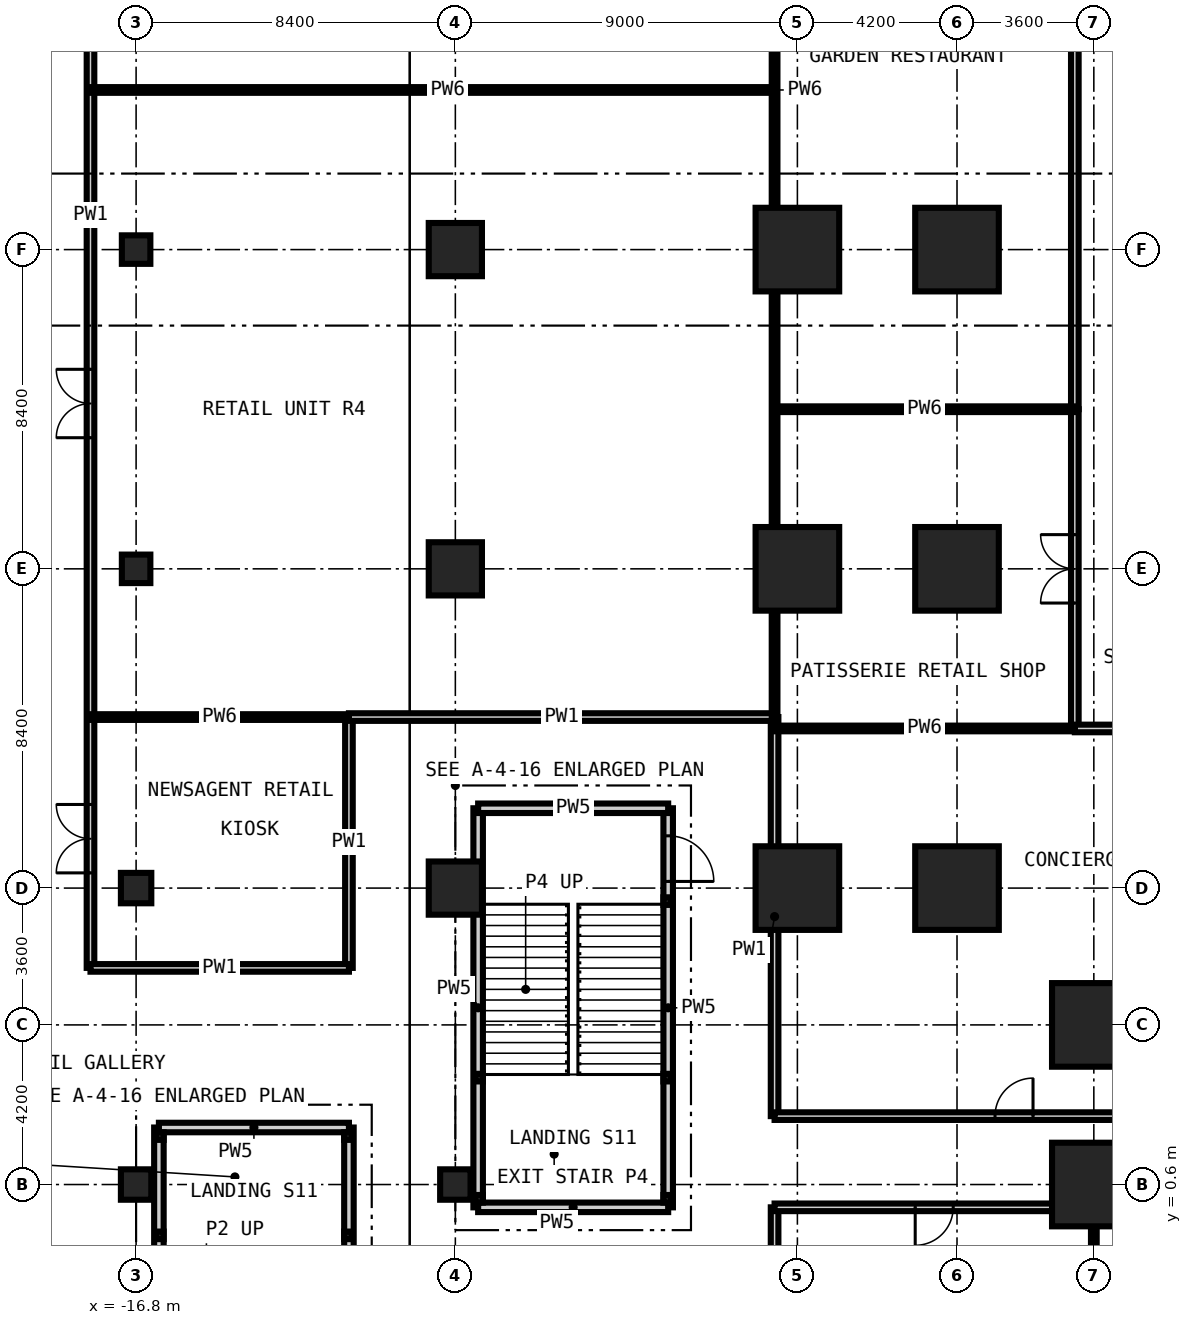
"""IFC4 building model, lengths in metres.
Left out: names, types, materials, properties, quantities, classifications, styles, units other than length and angle.
Written with IfcOpenShell. Run it as: python <this file> out.ifc"""

import sys

from ifc_helpers import new_model, si_unit, direction, frame, frame_2d, origin, origin_with_axes, origin_2d, place, context, subcontext, project, spatial, rectangle, hollow_rectangle, extrude, element, fill, save


model = new_model("IFC4")
c1 = context("Model", 3, precision=1e-05, world=origin(), true_north=direction((0.0, 1.0)))
c2 = subcontext(c1, "Body", "Model", "MODEL_VIEW")
j1 = project(units=[si_unit("LENGTHUNIT", "METRE"), si_unit("PLANEANGLEUNIT", "RADIAN")], contexts=[c1])
p1 = place(None, origin())
s1 = spatial("IfcSite", under=j1, at=p1, CompositionType="ELEMENT")
p2 = place(p1, origin())
s2 = spatial("IfcBuilding", under=s1, at=p2, CompositionType="ELEMENT")
p3 = place(p2, origin())
s3 = spatial("IfcBuildingStorey", under=s2, at=p3, CompositionType="ELEMENT", Elevation=0.0)
for number, where, z_axis, x_axis in (
    (1, (0.6, 8.4, -0.3), (0.0, 0.0, 1.0), (1.0, 0.0, 0.0)),
    (2, (0.6, 16.8, -0.3), (0.0, 0.0, 1.0), (1.0, 0.0, 0.0)),
    (3, (0.6, 25.2, -0.3), (0.0, 0.0, 1.0), (1.0, 0.0, 0.0)),
    (4, (4.8, 8.4, -0.3), (0.0, 0.0, 1.0), (1.0, 0.0, 0.0)),
    (5, (4.8, 16.8, -0.3), (0.0, 0.0, 1.0), (1.0, 0.0, 0.0)),
    (6, (4.8, 25.2, -0.3), (0.0, 0.0, 1.0), (1.0, 0.0, 0.0)),
    (7, (8.4, 0.6, -0.3), (0.0, 0.0, 1.0), (1.0, 0.0, 0.0)),
    (8, (8.4, 4.8, -0.3), (0.0, 0.0, 1.0), (1.0, 0.0, 0.0)),
):
    element("IfcColumn", number, at=place(p3, frame(where, z_axis=z_axis, x_axis=x_axis)), inside=s3, PredefinedType="COLUMN", context=c2, shape_type="SweptSolid", body=[
        extrude(rectangle(XDim=2.2, YDim=2.2, at=origin_2d()), origin(), (0.0, 0.0, 1.0), 6.0),
    ])
p4 = place(p3, frame((-16.8, 0.6, -0.5), z_axis=(0.0, 0.0, 1.0), x_axis=(1.0, 0.0, 0.0)))
e9 = element("IfcColumn", 9, at=p4, inside=s3, PredefinedType="COLUMN", context=c2, shape_type="SweptSolid", body=[
    extrude(rectangle(XDim=0.8, YDim=0.8, at=origin_2d()), origin(), (0.0, 0.0, 1.0), 6.2),
])
p5 = place(p3, frame((-16.8, 8.4, -0.3), z_axis=(0.0, 0.0, 1.0), x_axis=(1.0, 0.0, 0.0)))
e10 = element("IfcColumn", 10, at=p5, inside=s3, PredefinedType="COLUMN", context=c2, shape_type="SweptSolid", body=[
    extrude(rectangle(XDim=0.8, YDim=0.8, at=origin_2d()), origin(), (0.0, 0.0, 1.0), 6.0),
])
for number, where, z_axis, x_axis in (
    (11, (-16.8, 16.8, -0.5), (0.0, 0.0, 1.0), (1.0, 0.0, 0.0)),
    (12, (-16.8, 25.2, -0.5), (0.0, 0.0, 1.0), (1.0, 0.0, 0.0)),
):
    element("IfcColumn", number, at=place(p3, frame(where, z_axis=z_axis, x_axis=x_axis)), inside=s3, PredefinedType="COLUMN", context=c2, shape_type="SweptSolid", body=[
        extrude(rectangle(XDim=0.75, YDim=0.75, at=origin_2d()), origin(), (0.0, 0.0, 1.0), 6.2),
    ])
p6 = place(p3, frame((-8.4, 0.6, -0.3), z_axis=(0.0, 0.0, 1.0), x_axis=(1.0, 0.0, 0.0)))
e13 = element("IfcColumn", 13, at=p6, inside=s3, PredefinedType="COLUMN", context=c2, shape_type="SweptSolid", body=[
    extrude(rectangle(XDim=0.8, YDim=0.8, at=origin_2d()), origin(), (0.0, 0.0, 1.0), 6.0),
])
for number, where, z_axis, x_axis in (
    (14, (-8.4, 8.4, -0.3), (0.0, 0.0, 1.0), (1.0, 0.0, 0.0)),
    (15, (-8.4, 16.8, -0.3), (0.0, 0.0, 1.0), (1.0, 0.0, 0.0)),
    (16, (-8.4, 25.2, -0.3), (0.0, 0.0, 1.0), (1.0, 0.0, 0.0)),
):
    element("IfcColumn", number, at=place(p3, frame(where, z_axis=z_axis, x_axis=x_axis)), inside=s3, PredefinedType="COLUMN", context=c2, shape_type="SweptSolid", body=[
        extrude(rectangle(XDim=1.4, YDim=1.4, at=origin_2d()), origin(), (0.0, 0.0, 1.0), 6.0),
    ])
p7 = place(p3, frame((-18.0, 6.3, 0.0), z_axis=(0.0, 0.0, 1.0), x_axis=(0.0, 1.0, 0.0)))
e17 = element("IfcWall", 17, at=p7, inside=s3, PredefinedType="PARTITIONING", context=c2, shape_type="SweptSolid", body=[
    extrude(rectangle(XDim=39.6, YDim=0.2, at=frame_2d((19.8, 0.0))), origin(), (0.0, 0.0, 1.0), 5.7),
])
p8 = place(p7, frame((13.95, 0.0, 0.0)))
e18 = element("IfcOpeningElement", 18, at=p8, cuts=e17, PredefinedType="OPENING", context=c2, shape_type="SweptSolid", body=[
    extrude(rectangle(XDim=1.8, YDim=2.7, at=frame_2d((0.9, 1.35))), frame((0.0, 0.11, 0.0), z_axis=(0.0, -1.0, 0.0), x_axis=(1.0, 0.0, 0.0)), (0.0, 0.0, 1.0), 0.22),
])
p9 = place(p7, frame((30.45, 0.0, 0.0)))
e19 = element("IfcOpeningElement", 19, at=p9, cuts=e17, PredefinedType="OPENING", context=c2, shape_type="SweptSolid", body=[
    extrude(rectangle(XDim=1.8, YDim=2.7, at=frame_2d((0.9, 1.35))), frame((0.0, 0.11, 0.0), z_axis=(0.0, -1.0, 0.0), x_axis=(1.0, 0.0, 0.0)), (0.0, 0.0, 1.0), 0.22),
])
p10 = place(p7, frame((2.5, 0.0, 0.0)))
e20 = element("IfcOpeningElement", 20, at=p10, cuts=e17, PredefinedType="OPENING", context=c2, shape_type="SweptSolid", body=[
    extrude(rectangle(XDim=1.8, YDim=2.7, at=frame_2d((0.9, 1.35))), frame((0.0, 0.11, 0.0), z_axis=(0.0, -1.0, 0.0), x_axis=(1.0, 0.0, 0.0)), (0.0, 0.0, 1.0), 0.22),
])
p11 = place(p3, frame((-11.2, 6.3, 0.0), z_axis=(0.0, 0.0, 1.0), x_axis=(0.0, 1.0, 0.0)))
e21 = element("IfcWall", 21, at=p11, inside=s3, PredefinedType="PARTITIONING", context=c2, shape_type="SweptSolid", body=[
    extrude(rectangle(XDim=6.6, YDim=0.2, at=frame_2d((3.3, 0.0))), origin(), (0.0, 0.0, 1.0), 5.7),
])
p12 = place(p3, frame((0.0, -8.4, 0.0), z_axis=(0.0, 0.0, 1.0), x_axis=(0.0, 1.0, 0.0)))
e22 = element("IfcWall", 22, at=p12, inside=s3, PredefinedType="PARTITIONING", context=c2, shape_type="SweptSolid", body=[
    extrude(rectangle(XDim=8.4, YDim=0.2, at=frame_2d((4.2, 0.0))), origin(), (0.0, 0.0, 1.0), 5.7),
])
p13 = place(p3, frame((0.0, 2.4, 0.0), z_axis=(0.0, 0.0, 1.0), x_axis=(0.0, 1.0, 0.0)))
e23 = element("IfcWall", 23, at=p13, inside=s3, PredefinedType="PARTITIONING", context=c2, shape_type="SweptSolid", body=[
    extrude(rectangle(XDim=10.5, YDim=0.2, at=frame_2d((5.25, 0.0))), origin(), (0.0, 0.0, 1.0), 5.7),
])
p14 = place(p3, frame((7.9, 12.6, 0.0), z_axis=(0.0, 0.0, 1.0), x_axis=(0.0, 1.0, 0.0)))
e24 = element("IfcWall", 24, at=p14, inside=s3, PredefinedType="PARTITIONING", context=c2, shape_type="SweptSolid", body=[
    extrude(rectangle(XDim=8.4, YDim=0.2, at=frame_2d((4.2, 0.0))), origin(), (0.0, 0.0, 1.0), 5.7),
])
p15 = place(p14, frame((3.3, 0.0, 0.0)))
e25 = element("IfcOpeningElement", 25, at=p15, cuts=e24, PredefinedType="OPENING", context=c2, shape_type="SweptSolid", body=[
    extrude(rectangle(XDim=1.8, YDim=2.4, at=frame_2d((0.9, 1.2))), frame((0.0, 0.11, 0.0), z_axis=(0.0, -1.0, 0.0), x_axis=(1.0, 0.0, 0.0)), (0.0, 0.0, 1.0), 0.22),
])
p16 = place(p3, origin_with_axes())
e26 = element("IfcWall", 26, at=p16, inside=s3, PredefinedType="PARTITIONING", context=c2, shape_type="SweptSolid", body=[
    extrude(rectangle(XDim=25.2, YDim=0.2, at=frame_2d((12.6, 0.0))), origin(), (0.0, 0.0, 1.0), 5.7),
])
p17 = place(p16, frame((3.7, 0.0, 0.0)))
e27 = element("IfcOpeningElement", 27, at=p17, cuts=e26, PredefinedType="OPENING", context=c2, shape_type="SweptSolid", body=[
    extrude(rectangle(XDim=1.0, YDim=2.1, at=frame_2d((0.5, 1.05))), frame((0.0, 0.11, 0.0), z_axis=(0.0, -1.0, 0.0), x_axis=(1.0, 0.0, 0.0)), (0.0, 0.0, 1.0), 0.22),
])
p18 = place(p16, frame((12.1, 0.0, 0.0)))
e28 = element("IfcOpeningElement", 28, at=p18, cuts=e26, PredefinedType="OPENING", context=c2, shape_type="SweptSolid", body=[
    extrude(rectangle(XDim=1.0, YDim=2.1, at=frame_2d((0.5, 1.05))), frame((0.0, 0.11, 0.0), z_axis=(0.0, -1.0, 0.0), x_axis=(1.0, 0.0, 0.0)), (0.0, 0.0, 1.0), 0.22),
])
p19 = place(p3, frame((0.0, 2.4, 0.0), z_axis=(0.0, 0.0, 1.0), x_axis=(1.0, 0.0, 0.0)))
e29 = element("IfcWall", 29, at=p19, inside=s3, PredefinedType="PARTITIONING", context=c2, shape_type="SweptSolid", body=[
    extrude(rectangle(XDim=54.6, YDim=0.2, at=frame_2d((27.3, 0.0))), origin(), (0.0, 0.0, 1.0), 5.7),
])
p20 = place(p19, frame((5.8, 0.0, 0.0)))
e30 = element("IfcOpeningElement", 30, at=p20, cuts=e29, PredefinedType="OPENING", context=c2, shape_type="SweptSolid", body=[
    extrude(rectangle(XDim=1.0, YDim=2.1, at=frame_2d((0.5, 1.05))), frame((0.0, 0.11, 0.0), z_axis=(0.0, -1.0, 0.0), x_axis=(1.0, 0.0, 0.0)), (0.0, 0.0, 1.0), 0.22),
])
p21 = place(p19, frame((18.4, 0.0, 0.0)))
e31 = element("IfcOpeningElement", 31, at=p21, cuts=e29, PredefinedType="OPENING", context=c2, shape_type="SweptSolid", body=[
    extrude(rectangle(XDim=1.0, YDim=2.1, at=frame_2d((0.5, 1.05))), frame((0.0, 0.11, 0.0), z_axis=(0.0, -1.0, 0.0), x_axis=(1.0, 0.0, 0.0)), (0.0, 0.0, 1.0), 0.22),
])
p22 = place(p19, frame((28.9, 0.0, 0.0)))
e32 = element("IfcOpeningElement", 32, at=p22, cuts=e29, PredefinedType="OPENING", context=c2, shape_type="SweptSolid", body=[
    extrude(rectangle(XDim=1.0, YDim=2.1, at=frame_2d((0.5, 1.05))), frame((0.0, 0.11, 0.0), z_axis=(0.0, -1.0, 0.0), x_axis=(1.0, 0.0, 0.0)), (0.0, 0.0, 1.0), 0.22),
])
p23 = place(p19, frame((37.3, 0.0, 0.0)))
e33 = element("IfcOpeningElement", 33, at=p23, cuts=e29, PredefinedType="OPENING", context=c2, shape_type="SweptSolid", body=[
    extrude(rectangle(XDim=1.0, YDim=2.1, at=frame_2d((0.5, 1.05))), frame((0.0, 0.11, 0.0), z_axis=(0.0, -1.0, 0.0), x_axis=(1.0, 0.0, 0.0)), (0.0, 0.0, 1.0), 0.22),
])
p24 = place(p3, frame((-18.0, 6.3, 0.0), z_axis=(0.0, 0.0, 1.0), x_axis=(1.0, 0.0, 0.0)))
e34 = element("IfcWall", 34, at=p24, inside=s3, PredefinedType="PARTITIONING", context=c2, shape_type="SweptSolid", body=[
    extrude(rectangle(XDim=6.8, YDim=0.2, at=frame_2d((3.4, 0.0))), origin(), (0.0, 0.0, 1.0), 5.7),
])
p25 = place(p3, frame((7.9, 12.6, 0.0), z_axis=(0.0, 0.0, 1.0), x_axis=(1.0, 0.0, 0.0)))
e35 = element("IfcWall", 35, at=p25, inside=s3, PredefinedType="PARTITIONING", context=c2, shape_type="SweptSolid", body=[
    extrude(rectangle(XDim=4.7, YDim=0.2, at=frame_2d((2.35, 0.0))), origin(), (0.0, 0.0, 1.0), 5.7),
])
p26 = place(p3, frame((7.9, 42.0, 0.0), z_axis=(0.0, 0.0, 1.0), x_axis=(0.0, -1.0, 0.0)))
e36 = element("IfcWall", 36, at=p26, inside=s3, PredefinedType="PARTITIONING", context=c2, shape_type="SweptSolid", body=[
    extrude(rectangle(XDim=21.0, YDim=0.2, at=frame_2d((10.5, 0.0))), origin(), (0.0, 0.0, 1.0), 5.7),
])
p27 = place(p26, frame((9.6, 0.0, 0.0)))
e37 = element("IfcOpeningElement", 37, at=p27, cuts=e36, PredefinedType="OPENING", context=c2, shape_type="SweptSolid", body=[
    extrude(rectangle(XDim=1.8, YDim=2.4, at=frame_2d((0.9, 1.2))), frame((0.0, 0.11, 0.0), z_axis=(0.0, -1.0, 0.0), x_axis=(1.0, 0.0, 0.0)), (0.0, 0.0, 1.0), 0.22),
])
p28 = place(p3, frame((0.0, 12.9, 0.0), z_axis=(0.0, 0.0, 1.0), x_axis=(-1.0, 0.0, 0.0)))
e38 = element("IfcWall", 38, at=p28, inside=s3, PredefinedType="PARTITIONING", context=c2, shape_type="SweptSolid", body=[
    extrude(rectangle(XDim=11.2, YDim=0.2, at=frame_2d((5.6, 0.0))), origin(), (0.0, 0.0, 1.0), 5.7),
])
p29 = place(p3, frame((0.0, 12.9, 0.0), z_axis=(0.0, 0.0, 1.0), x_axis=(0.0, 1.0, 0.0)))
e39 = element("IfcWall", 39, at=p29, inside=s3, PredefinedType="PARTITIONING", context=c2, shape_type="SweptSolid", body=[
    extrude(rectangle(XDim=33.0, YDim=0.15, at=frame_2d((16.5, 0.0))), origin(), (0.0, 0.0, 1.0), 5.7),
])
p30 = place(p3, frame((8.4, -8.4, 0.0), z_axis=(0.0, 0.0, 1.0), x_axis=(0.0, 1.0, 0.0)))
e40 = element("IfcWall", 40, at=p30, inside=s3, PredefinedType="PARTITIONING", context=c2, shape_type="SweptSolid", body=[
    extrude(rectangle(XDim=8.4, YDim=0.15, at=frame_2d((4.2, 0.0))), origin(), (0.0, 0.0, 1.0), 5.7),
])
p31 = place(p3, frame((0.0, 12.6, 0.0), z_axis=(0.0, 0.0, 1.0), x_axis=(1.0, 0.0, 0.0)))
e41 = element("IfcWall", 41, at=p31, inside=s3, PredefinedType="PARTITIONING", context=c2, shape_type="SweptSolid", body=[
    extrude(rectangle(XDim=7.9, YDim=0.15, at=frame_2d((3.95, 0.0))), origin(), (0.0, 0.0, 1.0), 5.7),
])
p32 = place(p3, frame((-18.0, 12.9, 0.0), z_axis=(0.0, 0.0, 1.0), x_axis=(1.0, 0.0, 0.0)))
e42 = element("IfcWall", 42, at=p32, inside=s3, PredefinedType="PARTITIONING", context=c2, shape_type="SweptSolid", body=[
    extrude(rectangle(XDim=6.8, YDim=0.15, at=frame_2d((3.4, 0.0))), origin(), (0.0, 0.0, 1.0), 5.7),
])
p33 = place(p3, frame((0.0, 21.0, 0.0), z_axis=(0.0, 0.0, 1.0), x_axis=(1.0, 0.0, 0.0)))
e43 = element("IfcWall", 43, at=p33, inside=s3, PredefinedType="PARTITIONING", context=c2, shape_type="SweptSolid", body=[
    extrude(rectangle(XDim=7.9, YDim=0.15, at=frame_2d((3.95, 0.0))), origin(), (0.0, 0.0, 1.0), 5.7),
])
p34 = place(p3, frame((-18.0, 29.4, 0.0), z_axis=(0.0, 0.0, 1.0), x_axis=(1.0, 0.0, 0.0)))
e44 = element("IfcWall", 44, at=p34, inside=s3, PredefinedType="PARTITIONING", context=c2, shape_type="SweptSolid", body=[
    extrude(rectangle(XDim=18.0, YDim=0.15, at=frame_2d((9.0, 0.0))), origin(), (0.0, 0.0, 1.0), 5.7),
])
p35 = place(p3, frame((-16.2, -8.4, 0.0), z_axis=(0.0, 0.0, 1.0), x_axis=(0.0, 1.0, 0.0)))
e45 = element("IfcWall", 45, at=p35, inside=s3, PredefinedType="PARTITIONING", context=c2, shape_type="SweptSolid", body=[
    extrude(rectangle(XDim=10.5, YDim=0.25, at=frame_2d((5.25, 0.0))), origin(), (0.0, 0.0, 1.0), 5.7),
])
p36 = place(p3, frame((-11.2, -8.4, 0.0), z_axis=(0.0, 0.0, 1.0), x_axis=(0.0, 1.0, 0.0)))
e46 = element("IfcWall", 46, at=p36, inside=s3, PredefinedType="PARTITIONING", context=c2, shape_type="SweptSolid", body=[
    extrude(rectangle(XDim=10.5, YDim=0.25, at=frame_2d((5.25, 0.0))), origin(), (0.0, 0.0, 1.0), 5.7),
])
p37 = place(p36, frame((0.95, 0.0, 0.0)))
e47 = element("IfcOpeningElement", 47, at=p37, cuts=e46, PredefinedType="OPENING", context=c2, shape_type="SweptSolid", body=[
    extrude(rectangle(XDim=1.2, YDim=2.2, at=frame_2d((0.6, 1.1))), frame((0.0, 0.135, 0.0), z_axis=(0.0, -1.0, 0.0), x_axis=(1.0, 0.0, 0.0)), (0.0, 0.0, 1.0), 0.27),
])
p38 = place(p3, frame((-7.8, 0.0, 0.0), z_axis=(0.0, 0.0, 1.0), x_axis=(0.0, 1.0, 0.0)))
e48 = element("IfcWall", 48, at=p38, inside=s3, PredefinedType="PARTITIONING", context=c2, shape_type="SweptSolid", body=[
    extrude(rectangle(XDim=10.5, YDim=0.25, at=frame_2d((5.25, 0.0))), origin(), (0.0, 0.0, 1.0), 5.7),
])
p39 = place(p3, frame((-2.8, 0.0, 0.0), z_axis=(0.0, 0.0, 1.0), x_axis=(0.0, 1.0, 0.0)))
e49 = element("IfcWall", 49, at=p39, inside=s3, PredefinedType="PARTITIONING", context=c2, shape_type="SweptSolid", body=[
    extrude(rectangle(XDim=10.5, YDim=0.25, at=frame_2d((5.25, 0.0))), origin(), (0.0, 0.0, 1.0), 5.7),
])
p40 = place(p39, frame((8.575, 0.0, 0.0)))
e50 = element("IfcOpeningElement", 50, at=p40, cuts=e49, PredefinedType="OPENING", context=c2, shape_type="SweptSolid", body=[
    extrude(rectangle(XDim=1.2, YDim=2.2, at=frame_2d((0.6, 1.1))), frame((0.0, 0.135, 0.0), z_axis=(0.0, -1.0, 0.0), x_axis=(1.0, 0.0, 0.0)), (0.0, 0.0, 1.0), 0.27),
])
for number, where, z_axis, x_axis in (
    (51, (-7.8, 0.0, 0.0), (0.0, 0.0, 1.0), (1.0, 0.0, 0.0)),
    (52, (-16.2, 2.1, 0.0), (0.0, 0.0, 1.0), (1.0, 0.0, 0.0)),
    (53, (-7.8, 10.5, 0.0), (0.0, 0.0, 1.0), (1.0, 0.0, 0.0)),
):
    element("IfcWall", number, at=place(p3, frame(where, z_axis=z_axis, x_axis=x_axis)), inside=s3, PredefinedType="PARTITIONING", context=c2, shape_type="SweptSolid", body=[
        extrude(rectangle(XDim=5.0, YDim=0.25, at=frame_2d((2.5, 0.0))), origin(), (0.0, 0.0, 1.0), 5.7),
    ])
for number, where, z_axis, x_axis in (
    (54, (-16.175, -0.738, -0.5), (0.0, 0.0, 1.0), (1.0, 0.0, 0.0)),
    (55, (-11.225, -0.738, -0.5), (0.0, 0.0, 1.0), (1.0, 0.0, 0.0)),
    (56, (-16.175, 1.875, -0.5), (0.0, 0.0, 1.0), (1.0, 0.0, 0.0)),
    (57, (-11.225, 1.875, -0.5), (0.0, 0.0, 1.0), (1.0, 0.0, 0.0)),
):
    element("IfcColumn", number, at=place(p3, frame(where, z_axis=z_axis, x_axis=x_axis)), inside=s3, PredefinedType="COLUMN", context=c2, shape_type="SweptSolid", body=[
        extrude(hollow_rectangle(XDim=0.2, YDim=0.2, WallThickness=0.01, at=origin_2d()), origin(), (0.0, 0.0, 1.0), 6.2),
    ])
for number, where, z_axis, x_axis in (
    (58, (-2.825, 8.058, -0.3), (0.0, 0.0, 1.0), (1.0, 0.0, 0.0)),
    (59, (-7.775, 3.413, -0.3), (0.0, 0.0, 1.0), (1.0, 0.0, 0.0)),
    (60, (-2.825, 3.413, -0.3), (0.0, 0.0, 1.0), (1.0, 0.0, 0.0)),
    (61, (-7.775, 0.225, -0.3), (0.0, 0.0, 1.0), (1.0, 0.0, 0.0)),
    (62, (-2.825, 0.225, -0.3), (0.0, 0.0, 1.0), (1.0, 0.0, 0.0)),
):
    element("IfcColumn", number, at=place(p3, frame(where, z_axis=z_axis, x_axis=x_axis)), inside=s3, PredefinedType="COLUMN", context=c2, shape_type="SweptSolid", body=[
        extrude(hollow_rectangle(XDim=0.2, YDim=0.2, WallThickness=0.01, at=origin_2d()), origin(), (0.0, 0.0, 1.0), 6.0),
    ])
p41 = place(p40, frame((1.2, 0.0, 0.0), z_axis=(0.0, 0.0, 1.0), x_axis=(-1.0, 0.0, 0.0)))
e63 = element("IfcDoor", 63, at=p41, inside=s3, OperationType="SINGLE_SWING_RIGHT", PredefinedType="DOOR", context=c2, shape_type="SweptSolid", body=[
    extrude(rectangle(XDim=1.2, YDim=2.2, at=frame_2d((0.6, 1.1))), frame((0.0, 0.025, 0.0), z_axis=(0.0, -1.0, 0.0), x_axis=(1.0, 0.0, 0.0)), (0.0, 0.0, 1.0), 0.05),
])
fill(e50, e63)
p42 = place(p17, frame((1.0, 0.0, 0.0), z_axis=(0.0, 0.0, 1.0), x_axis=(-1.0, 0.0, 0.0)))
e64 = element("IfcDoor", 64, at=p42, inside=s3, OperationType="SINGLE_SWING_RIGHT", PredefinedType="DOOR", context=c2, shape_type="SweptSolid", body=[
    extrude(rectangle(XDim=1.0, YDim=2.1, at=frame_2d((0.5, 1.05))), frame((0.0, 0.025, 0.0), z_axis=(0.0, -1.0, 0.0), x_axis=(1.0, 0.0, 0.0)), (0.0, 0.0, 1.0), 0.05),
])
fill(e27, e64)
p43 = place(p8, origin())
e65 = element("IfcDoor", 65, at=p43, inside=s3, OperationType="DOUBLE_DOOR_DOUBLE_SWING", PredefinedType="DOOR", context=c2, shape_type="SweptSolid", body=[
    extrude(rectangle(XDim=1.8, YDim=2.7, at=frame_2d((0.9, 1.35))), frame((0.0, 0.025, 0.0), z_axis=(0.0, -1.0, 0.0), x_axis=(1.0, 0.0, 0.0)), (0.0, 0.0, 1.0), 0.05),
])
fill(e18, e65)
p44 = place(p15, origin())
e66 = element("IfcDoor", 66, at=p44, inside=s3, OperationType="DOUBLE_DOOR_DOUBLE_SWING", PredefinedType="DOOR", context=c2, shape_type="SweptSolid", body=[
    extrude(rectangle(XDim=1.8, YDim=2.4, at=frame_2d((0.9, 1.2))), frame((0.0, 0.025, 0.0), z_axis=(0.0, -1.0, 0.0), x_axis=(1.0, 0.0, 0.0)), (0.0, 0.0, 1.0), 0.05),
])
fill(e25, e66)
p45 = place(p20, origin())
e67 = element("IfcDoor", 67, at=p45, inside=s3, OperationType="SINGLE_SWING_RIGHT", PredefinedType="DOOR", context=c2, shape_type="SweptSolid", body=[
    extrude(rectangle(XDim=1.0, YDim=2.1, at=frame_2d((0.5, 1.05))), frame((0.0, 0.025, 0.0), z_axis=(0.0, -1.0, 0.0), x_axis=(1.0, 0.0, 0.0)), (0.0, 0.0, 1.0), 0.05),
])
fill(e30, e67)
p46 = place(p10, origin())
e68 = element("IfcDoor", 68, at=p46, inside=s3, OperationType="DOUBLE_DOOR_DOUBLE_SWING", PredefinedType="DOOR", context=c2, shape_type="SweptSolid", body=[
    extrude(rectangle(XDim=1.8, YDim=2.7, at=frame_2d((0.9, 1.35))), frame((0.0, 0.025, 0.0), z_axis=(0.0, -1.0, 0.0), x_axis=(1.0, 0.0, 0.0)), (0.0, 0.0, 1.0), 0.05),
])
fill(e20, e68)
save(model, sys.argv[1])
